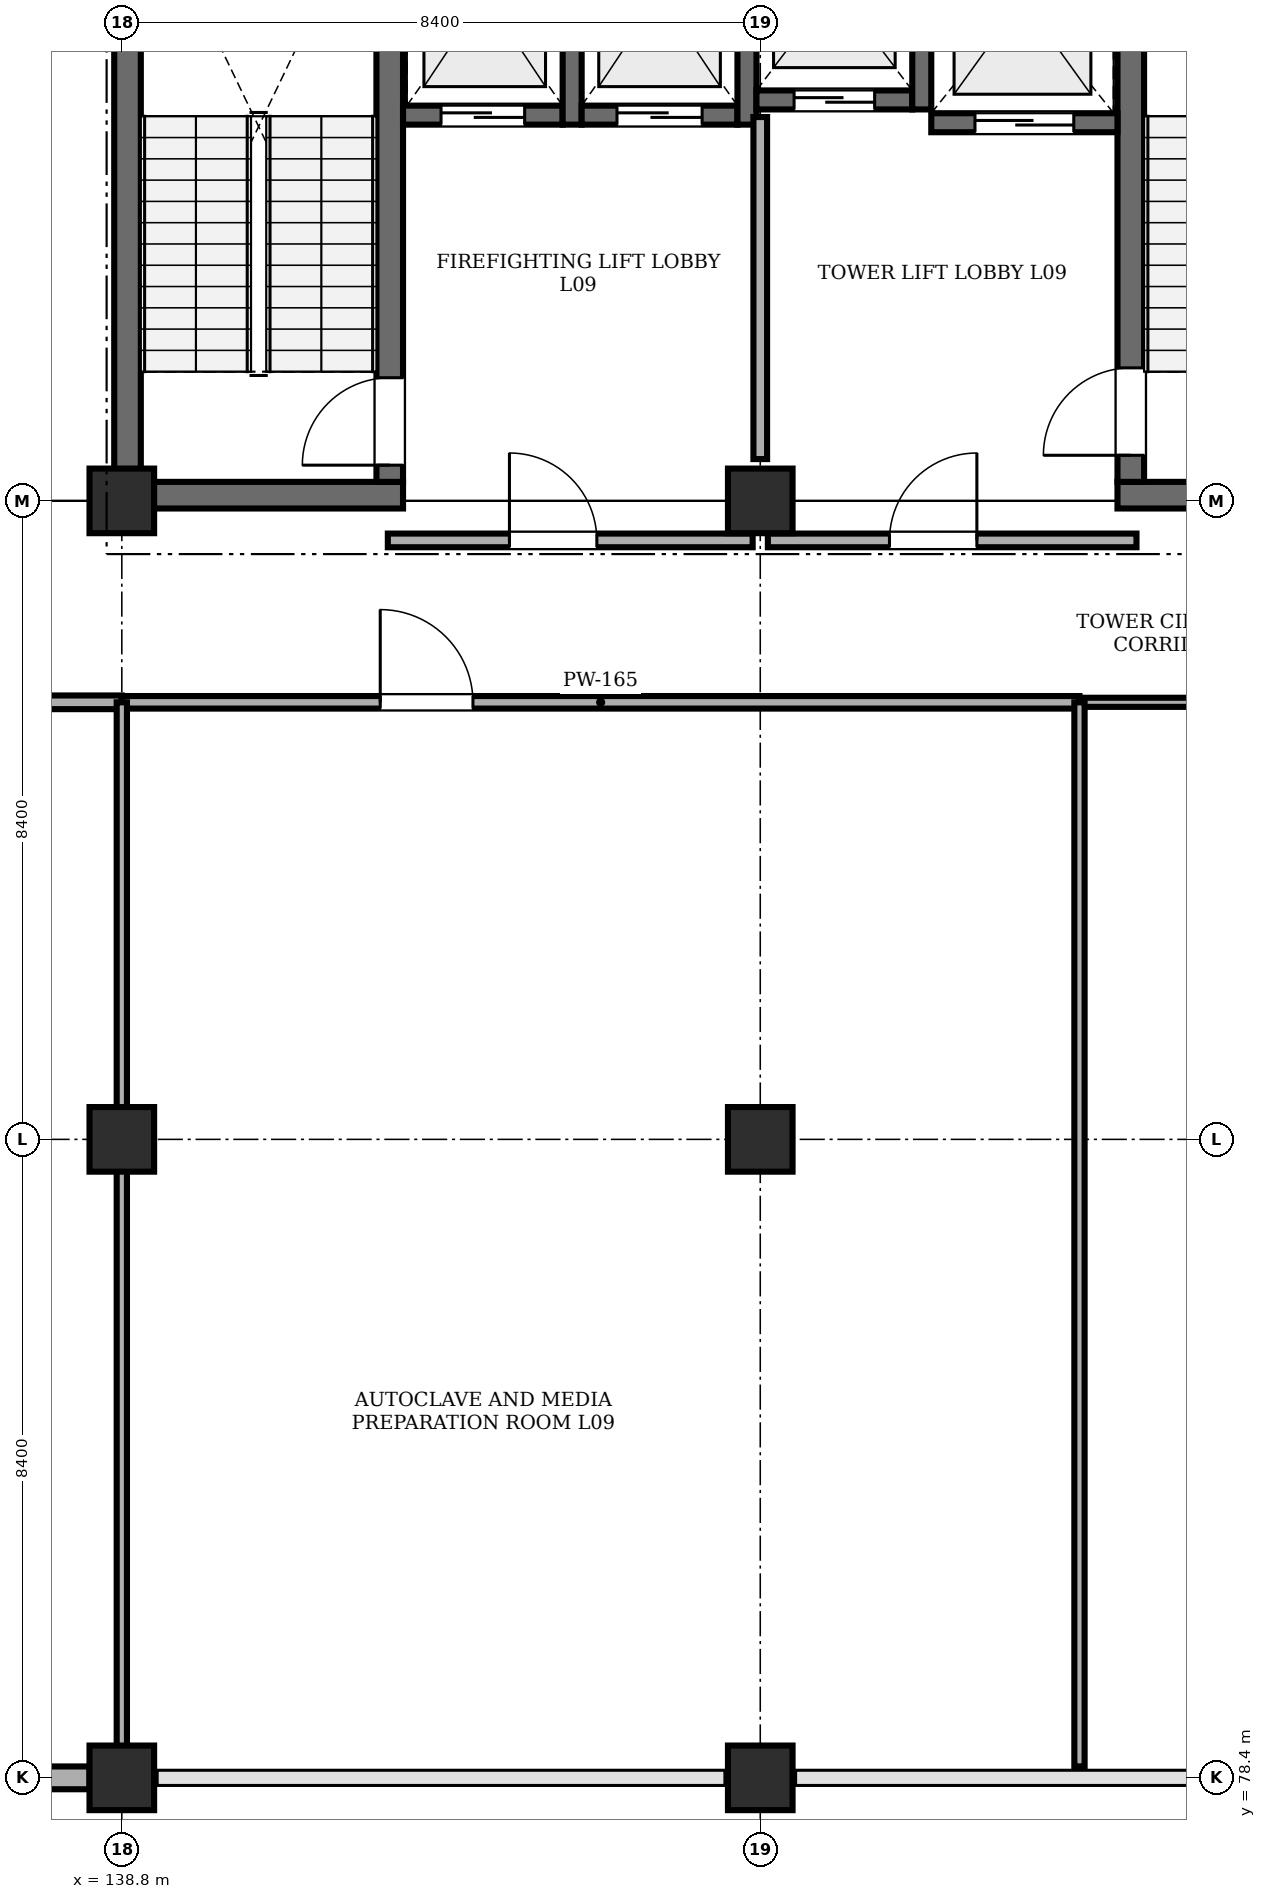
"""IFC4 building model, lengths in metres.
Left out: names, types, materials, properties, quantities, classifications, styles, units other than length and angle.
Written with IfcOpenShell. Run it as: python <this file> out.ifc"""

import sys

from ifc_helpers import new_model, si_unit, direction, frame, frame_2d, origin, origin_2d, place, context, subcontext, project, spatial, rectangle, extrude, element, fill, save


model = new_model("IFC4")
c1 = context("Model", 3, precision=1e-05, world=origin(), true_north=direction((0.0, 1.0)))
c2 = subcontext(c1, "Body", "Model", "MODEL_VIEW")
j1 = project(units=[si_unit("LENGTHUNIT", "METRE"), si_unit("PLANEANGLEUNIT", "RADIAN")], contexts=[c1])
p1 = place(None, origin())
s1 = spatial("IfcSite", under=j1, at=p1, CompositionType="ELEMENT")
p2 = place(p1, origin())
s2 = spatial("IfcBuilding", under=s1, at=p2, CompositionType="ELEMENT")
p3 = place(p2, frame((0.0, 0.0, 36.0)))
s3 = spatial("IfcBuildingStorey", under=s2, at=p3, CompositionType="ELEMENT", Elevation=36.0)
for number, where, z_axis, x_axis in (
    (1, (138.8, 78.4, 0.0), (0.0, 0.0, 1.0), (1.0, 0.0, 0.0)),
    (2, (138.8, 86.8, 0.0), (0.0, 0.0, 1.0), (1.0, 0.0, 0.0)),
    (3, (138.8, 95.2, 0.0), (0.0, 0.0, 1.0), (1.0, 0.0, 0.0)),
    (4, (147.2, 78.4, 0.0), (0.0, 0.0, 1.0), (1.0, 0.0, 0.0)),
    (5, (147.2, 86.8, 0.0), (0.0, 0.0, 1.0), (1.0, 0.0, 0.0)),
    (6, (147.2, 95.2, 0.0), (0.0, 0.0, 1.0), (1.0, 0.0, 0.0)),
):
    element("IfcColumn", number, at=place(p3, frame(where, z_axis=z_axis, x_axis=x_axis)), inside=s3, PredefinedType="COLUMN", context=c2, shape_type="SweptSolid", body=[
        extrude(rectangle(XDim=0.85, YDim=0.85, at=origin_2d()), origin(), (0.0, 0.0, 1.0), 4.02),
    ])
p4 = place(p3, frame((138.7, 95.275, 0.0), z_axis=(0.0, 0.0, 1.0), x_axis=(1.0, 0.0, 0.0)))
e7 = element("IfcWall", 7, at=p4, inside=s3, PredefinedType="SHEAR", context=c2, shape_type="SweptSolid", body=[
    extrude(rectangle(XDim=3.8, YDim=0.35, at=frame_2d((1.9, 0.0))), origin(), (0.0, 0.0, 1.0), 4.02),
])
p5 = place(p3, frame((138.875, 95.45, 0.0), z_axis=(0.0, 0.0, 1.0), x_axis=(0.0, 1.0, 0.0)))
e8 = element("IfcWall", 8, at=p5, inside=s3, PredefinedType="SHEAR", context=c2, shape_type="SweptSolid", body=[
    extrude(rectangle(XDim=7.9, YDim=0.35, at=frame_2d((3.95, 0.0))), origin(), (0.0, 0.0, 1.0), 4.02),
])
p6 = place(p3, frame((142.325, 95.45, 0.0), z_axis=(0.0, 0.0, 1.0), x_axis=(0.0, 1.0, 0.0)))
e9 = element("IfcWall", 9, at=p6, inside=s3, PredefinedType="SHEAR", context=c2, shape_type="SweptSolid", body=[
    extrude(rectangle(XDim=7.9, YDim=0.35, at=frame_2d((3.95, 0.0))), origin(), (0.0, 0.0, 1.0), 4.02),
])
p7 = place(p6, frame((0.22, 0.0, 0.0)))
e10 = element("IfcOpeningElement", 10, at=p7, cuts=e9, PredefinedType="OPENING", context=c2, shape_type="SweptSolid", body=[
    extrude(rectangle(XDim=1.15, YDim=2.15, at=frame_2d((0.575, 1.075))), frame((0.0, 0.185, 0.0), z_axis=(0.0, -1.0, 0.0), x_axis=(1.0, 0.0, 0.0)), (0.0, 0.0, 1.0), 0.37),
])
p8 = place(p3, frame((151.9, 95.275, 0.0), z_axis=(0.0, 0.0, 1.0), x_axis=(1.0, 0.0, 0.0)))
e11 = element("IfcWall", 11, at=p8, inside=s3, PredefinedType="SHEAR", context=c2, shape_type="SweptSolid", body=[
    extrude(rectangle(XDim=3.8, YDim=0.35, at=frame_2d((1.9, 0.0))), origin(), (0.0, 0.0, 1.0), 4.02),
])
p9 = place(p3, frame((152.075, 95.45, 0.0), z_axis=(0.0, 0.0, 1.0), x_axis=(0.0, 1.0, 0.0)))
e12 = element("IfcWall", 12, at=p9, inside=s3, PredefinedType="SHEAR", context=c2, shape_type="SweptSolid", body=[
    extrude(rectangle(XDim=7.9, YDim=0.35, at=frame_2d((3.95, 0.0))), origin(), (0.0, 0.0, 1.0), 4.02),
])
p10 = place(p9, frame((0.35, 0.0, 0.0)))
e13 = element("IfcOpeningElement", 13, at=p10, cuts=e12, PredefinedType="OPENING", context=c2, shape_type="SweptSolid", body=[
    extrude(rectangle(XDim=1.15, YDim=2.15, at=frame_2d((0.575, 1.075))), frame((0.0, 0.185, 0.0), z_axis=(0.0, -1.0, 0.0), x_axis=(1.0, 0.0, 0.0)), (0.0, 0.0, 1.0), 0.37),
])
p11 = place(p3, frame((142.5, 100.275, 0.0), z_axis=(0.0, 0.0, 1.0), x_axis=(1.0, 0.0, 0.0)))
e14 = element("IfcWall", 14, at=p11, inside=s3, PredefinedType="SHEAR", context=c2, shape_type="SweptSolid", body=[
    extrude(rectangle(XDim=2.1, YDim=0.25, at=frame_2d((1.05, 0.0))), origin(), (0.0, 0.0, 1.0), 4.02),
])
p12 = place(p11, frame((0.5, 0.0, 0.0)))
e15 = element("IfcOpeningElement", 15, at=p12, cuts=e14, PredefinedType="OPENING", context=c2, shape_type="SweptSolid", body=[
    extrude(rectangle(XDim=1.1, YDim=2.15, at=frame_2d((0.55, 1.075))), frame((0.0, 0.135, 0.0), z_axis=(0.0, -1.0, 0.0), x_axis=(1.0, 0.0, 0.0)), (0.0, 0.0, 1.0), 0.27),
])
p13 = place(p3, frame((144.725, 100.15, 0.0), z_axis=(0.0, 0.0, 1.0), x_axis=(0.0, 1.0, 0.0)))
e16 = element("IfcWall", 16, at=p13, inside=s3, PredefinedType="SHEAR", context=c2, shape_type="SweptSolid", body=[
    extrude(rectangle(XDim=3.4, YDim=0.25, at=frame_2d((1.7, 0.0))), origin(), (0.0, 0.0, 1.0), 4.02),
])
p14 = place(p3, frame((144.85, 100.275, 0.0), z_axis=(0.0, 0.0, 1.0), x_axis=(1.0, 0.0, 0.0)))
e17 = element("IfcWall", 17, at=p14, inside=s3, PredefinedType="SHEAR", context=c2, shape_type="SweptSolid", body=[
    extrude(rectangle(XDim=2.05, YDim=0.25, at=frame_2d((1.025, 0.0))), origin(), (0.0, 0.0, 1.0), 4.02),
])
p15 = place(p14, frame((0.465, 0.0, 0.0)))
e18 = element("IfcOpeningElement", 18, at=p15, cuts=e17, PredefinedType="OPENING", context=c2, shape_type="SweptSolid", body=[
    extrude(rectangle(XDim=1.12, YDim=2.15, at=frame_2d((0.56, 1.075))), frame((0.0, 0.135, 0.0), z_axis=(0.0, -1.0, 0.0), x_axis=(1.0, 0.0, 0.0)), (0.0, 0.0, 1.0), 0.27),
])
p16 = place(p3, frame((147.025, 100.15, 0.0), z_axis=(0.0, 0.0, 1.0), x_axis=(0.0, 1.0, 0.0)))
e19 = element("IfcWall", 19, at=p16, inside=s3, PredefinedType="SHEAR", context=c2, shape_type="SweptSolid", body=[
    extrude(rectangle(XDim=3.4, YDim=0.25, at=frame_2d((1.7, 0.0))), origin(), (0.0, 0.0, 1.0), 4.02),
])
p17 = place(p3, frame((147.15, 100.475, 0.0), z_axis=(0.0, 0.0, 1.0), x_axis=(1.0, 0.0, 0.0)))
e20 = element("IfcWall", 20, at=p17, inside=s3, PredefinedType="SHEAR", context=c2, shape_type="SweptSolid", body=[
    extrude(rectangle(XDim=2.05, YDim=0.25, at=frame_2d((1.025, 0.0))), origin(), (0.0, 0.0, 1.0), 4.02),
])
p18 = place(p17, frame((0.495, 0.0, 0.0)))
e21 = element("IfcOpeningElement", 21, at=p18, cuts=e20, PredefinedType="OPENING", context=c2, shape_type="SweptSolid", body=[
    extrude(rectangle(XDim=1.06, YDim=2.15, at=frame_2d((0.53, 1.075))), frame((0.0, 0.135, 0.0), z_axis=(0.0, -1.0, 0.0), x_axis=(1.0, 0.0, 0.0)), (0.0, 0.0, 1.0), 0.27),
])
p19 = place(p3, frame((149.325, 100.35, 0.0), z_axis=(0.0, 0.0, 1.0), x_axis=(0.0, 1.0, 0.0)))
e22 = element("IfcWall", 22, at=p19, inside=s3, PredefinedType="SHEAR", context=c2, shape_type="SweptSolid", body=[
    extrude(rectangle(XDim=3.2, YDim=0.25, at=frame_2d((1.6, 0.0))), origin(), (0.0, 0.0, 1.0), 4.02),
])
p20 = place(p3, frame((149.45, 100.175, 0.0), z_axis=(0.0, 0.0, 1.0), x_axis=(1.0, 0.0, 0.0)))
e23 = element("IfcWall", 23, at=p20, inside=s3, PredefinedType="SHEAR", context=c2, shape_type="SweptSolid", body=[
    extrude(rectangle(XDim=2.45, YDim=0.25, at=frame_2d((1.225, 0.0))), origin(), (0.0, 0.0, 1.0), 4.02),
])
p21 = place(p20, frame((0.575, 0.0, 0.0)))
e24 = element("IfcOpeningElement", 24, at=p21, cuts=e23, PredefinedType="OPENING", context=c2, shape_type="SweptSolid", body=[
    extrude(rectangle(XDim=1.3, YDim=2.25, at=frame_2d((0.65, 1.125))), frame((0.0, 0.135, 0.0), z_axis=(0.0, -1.0, 0.0), x_axis=(1.0, 0.0, 0.0)), (0.0, 0.0, 1.0), 0.27),
])
p22 = place(p3, frame((138.375, 78.4, 0.0), z_axis=(0.0, 0.0, 1.0), x_axis=(-1.0, 0.0, 0.0)))
e25 = element("IfcWall", 25, at=p22, inside=s3, PredefinedType="STANDARD", context=c2, shape_type="SweptSolid", body=[
    extrude(rectangle(XDim=7.55, YDim=0.3, at=frame_2d((3.775, 0.0))), origin(), (0.0, 0.0, 1.0), 3.32),
])
p23 = place(p22, frame((1.15, 0.0, 0.95)))
e26 = element("IfcOpeningElement", 26, at=p23, cuts=e25, PredefinedType="OPENING", context=c2, shape_type="SweptSolid", body=[
    extrude(rectangle(XDim=2.15, YDim=1.95, at=frame_2d((1.075, 0.975))), frame((0.0, 0.16, 0.0), z_axis=(0.0, -1.0, 0.0), x_axis=(1.0, 0.0, 0.0)), (0.0, 0.0, 1.0), 0.32),
])
p24 = place(p3, frame((142.3, 94.68, 0.0), z_axis=(0.0, 0.0, 1.0), x_axis=(1.0, 0.0, 0.0)))
e27 = element("IfcWall", 27, at=p24, inside=s3, PredefinedType="STANDARD", context=c2, shape_type="SweptSolid", body=[
    extrude(rectangle(XDim=4.8, YDim=0.18, at=frame_2d((2.4, 0.0))), origin(), (0.0, 0.0, 1.0), 4.02),
])
p25 = place(p24, frame((1.6, 0.0, 0.0)))
e28 = element("IfcOpeningElement", 28, at=p25, cuts=e27, PredefinedType="OPENING", context=c2, shape_type="SweptSolid", body=[
    extrude(rectangle(XDim=1.15, YDim=2.15, at=frame_2d((0.575, 1.075))), frame((0.0, 0.1, 0.0), z_axis=(0.0, -1.0, 0.0), x_axis=(1.0, 0.0, 0.0)), (0.0, 0.0, 1.0), 0.2),
])
p26 = place(p3, frame((147.3, 94.68, 0.0), z_axis=(0.0, 0.0, 1.0), x_axis=(1.0, 0.0, 0.0)))
e29 = element("IfcWall", 29, at=p26, inside=s3, PredefinedType="STANDARD", context=c2, shape_type="SweptSolid", body=[
    extrude(rectangle(XDim=4.85, YDim=0.18, at=frame_2d((2.425, 0.0))), origin(), (0.0, 0.0, 1.0), 4.02),
])
p27 = place(p26, frame((1.6, 0.0, 0.0)))
e30 = element("IfcOpeningElement", 30, at=p27, cuts=e29, PredefinedType="OPENING", context=c2, shape_type="SweptSolid", body=[
    extrude(rectangle(XDim=1.15, YDim=2.15, at=frame_2d((0.575, 1.075))), frame((0.0, 0.1, 0.0), z_axis=(0.0, -1.0, 0.0), x_axis=(1.0, 0.0, 0.0)), (0.0, 0.0, 1.0), 0.2),
])
p28 = place(p3, frame((147.2, 95.75, 0.0), z_axis=(0.0, 0.0, 1.0), x_axis=(0.0, 1.0, 0.0)))
e31 = element("IfcWall", 31, at=p28, inside=s3, PredefinedType="STANDARD", context=c2, shape_type="SweptSolid", body=[
    extrude(rectangle(XDim=4.5, YDim=0.18, at=frame_2d((2.25, 0.0))), origin(), (0.0, 0.0, 1.0), 3.32),
])
p29 = place(p3, frame((130.55, 92.55, 0.0), z_axis=(0.0, 0.0, 1.0), x_axis=(1.0, 0.0, 0.0)))
e32 = element("IfcWall", 32, at=p29, inside=s3, PredefinedType="STANDARD", context=c2, shape_type="SweptSolid", body=[
    extrude(rectangle(XDim=8.25, YDim=0.18, at=frame_2d((4.125, 0.0))), origin(), (0.0, 0.0, 1.0), 4.02),
])
p30 = place(p29, frame((3.65, 0.0, 0.0)))
e33 = element("IfcOpeningElement", 33, at=p30, cuts=e32, PredefinedType="OPENING", context=c2, shape_type="SweptSolid", body=[
    extrude(rectangle(XDim=1.05, YDim=2.15, at=frame_2d((0.525, 1.075))), frame((0.0, 0.1, 0.0), z_axis=(0.0, -1.0, 0.0), x_axis=(1.0, 0.0, 0.0)), (0.0, 0.0, 1.0), 0.2),
])
p31 = place(p3, frame((138.8, 92.55, 0.0), z_axis=(0.0, 0.0, 1.0), x_axis=(1.0, 0.0, 0.0)))
e34 = element("IfcWall", 34, at=p31, inside=s3, PredefinedType="PARTITIONING", context=c2, shape_type="SweptSolid", body=[
    extrude(rectangle(XDim=12.6, YDim=0.165, at=frame_2d((6.3, 0.0))), origin(), (0.0, 0.0, 1.0), 4.02),
])
p32 = place(p31, frame((3.4, 0.0, 0.0)))
e35 = element("IfcOpeningElement", 35, at=p32, cuts=e34, PredefinedType="OPENING", context=c2, shape_type="SweptSolid", body=[
    extrude(rectangle(XDim=1.22, YDim=2.2, at=frame_2d((0.61, 1.1))), frame((0.0, 0.093, 0.0), z_axis=(0.0, -1.0, 0.0), x_axis=(1.0, 0.0, 0.0)), (0.0, 0.0, 1.0), 0.185),
])
p33 = place(p3, frame((138.8, 78.55, 0.0), z_axis=(0.0, 0.0, 1.0), x_axis=(0.0, 1.0, 0.0)))
e36 = element("IfcWall", 36, at=p33, inside=s3, PredefinedType="PARTITIONING", context=c2, shape_type="SweptSolid", body=[
    extrude(rectangle(XDim=14.0, YDim=0.135, at=frame_2d((7.0, 0.0))), origin(), (0.0, 0.0, 1.0), 3.32),
])
p34 = place(p3, frame((151.4, 92.55, 0.0), z_axis=(0.0, 0.0, 1.0), x_axis=(1.0, 0.0, 0.0)))
e37 = element("IfcWall", 37, at=p34, inside=s3, PredefinedType="PARTITIONING", context=c2, shape_type="SweptSolid", body=[
    extrude(rectangle(XDim=11.95, YDim=0.12, at=frame_2d((5.975, 0.0))), origin(), (0.0, 0.0, 1.0), 4.02),
])
p35 = place(p34, frame((6.8, 0.0, 0.0)))
e38 = element("IfcOpeningElement", 38, at=p35, cuts=e37, PredefinedType="OPENING", context=c2, shape_type="SweptSolid", body=[
    extrude(rectangle(XDim=1.08, YDim=2.15, at=frame_2d((0.54, 1.075))), frame((0.0, 0.07, 0.0), z_axis=(0.0, -1.0, 0.0), x_axis=(1.0, 0.0, 0.0)), (0.0, 0.0, 1.0), 0.14),
])
p36 = place(p3, frame((151.4, 78.55, 0.0), z_axis=(0.0, 0.0, 1.0), x_axis=(0.0, 1.0, 0.0)))
e39 = element("IfcWall", 39, at=p36, inside=s3, PredefinedType="PARTITIONING", context=c2, shape_type="SweptSolid", body=[
    extrude(rectangle(XDim=14.0, YDim=0.135, at=frame_2d((7.0, 0.0))), origin(), (0.0, 0.0, 1.0), 3.52),
])
p37 = place(p25, origin())
e40 = element("IfcDoor", 40, at=p37, inside=s3, OperationType="SINGLE_SWING_LEFT", PredefinedType="DOOR", context=c2, shape_type="SweptSolid", body=[
    extrude(rectangle(XDim=1.15, YDim=2.15, at=frame_2d((0.575, 1.075))), frame((0.0, 0.025, 0.0), z_axis=(0.0, -1.0, 0.0), x_axis=(1.0, 0.0, 0.0)), (0.0, 0.0, 1.0), 0.05),
])
fill(e28, e40)
p38 = place(p27, origin())
e41 = element("IfcDoor", 41, at=p38, inside=s3, OperationType="SINGLE_SWING_RIGHT", PredefinedType="DOOR", context=c2, shape_type="SweptSolid", body=[
    extrude(rectangle(XDim=1.15, YDim=2.15, at=frame_2d((0.575, 1.075))), frame((0.0, 0.025, 0.0), z_axis=(0.0, -1.0, 0.0), x_axis=(1.0, 0.0, 0.0)), (0.0, 0.0, 1.0), 0.05),
])
fill(e30, e41)
p39 = place(p32, origin())
e42 = element("IfcDoor", 42, at=p39, inside=s3, OperationType="SINGLE_SWING_LEFT", PredefinedType="DOOR", context=c2, shape_type="SweptSolid", body=[
    extrude(rectangle(XDim=1.22, YDim=2.2, at=frame_2d((0.61, 1.1))), frame((0.0, 0.025, 0.0), z_axis=(0.0, -1.0, 0.0), x_axis=(1.0, 0.0, 0.0)), (0.0, 0.0, 1.0), 0.05),
])
fill(e35, e42)
p40 = place(p7, origin())
e43 = element("IfcDoor", 43, at=p40, inside=s3, OperationType="SINGLE_SWING_LEFT", PredefinedType="DOOR", context=c2, shape_type="SweptSolid", body=[
    extrude(rectangle(XDim=1.15, YDim=2.15, at=frame_2d((0.575, 1.075))), frame((0.0, 0.025, 0.0), z_axis=(0.0, -1.0, 0.0), x_axis=(1.0, 0.0, 0.0)), (0.0, 0.0, 1.0), 0.05),
])
fill(e10, e43)
p41 = place(p10, origin())
e44 = element("IfcDoor", 44, at=p41, inside=s3, OperationType="SINGLE_SWING_LEFT", PredefinedType="DOOR", context=c2, shape_type="SweptSolid", body=[
    extrude(rectangle(XDim=1.15, YDim=2.15, at=frame_2d((0.575, 1.075))), frame((0.0, 0.025, 0.0), z_axis=(0.0, -1.0, 0.0), x_axis=(1.0, 0.0, 0.0)), (0.0, 0.0, 1.0), 0.05),
])
fill(e13, e44)
p42 = place(p12, origin())
e45 = element("IfcDoor", 45, at=p42, inside=s3, OperationType="SLIDING_TO_LEFT", PredefinedType="DOOR", context=c2, shape_type="SweptSolid", body=[
    extrude(rectangle(XDim=1.1, YDim=2.15, at=frame_2d((0.55, 1.075))), frame((0.0, 0.025, 0.0), z_axis=(0.0, -1.0, 0.0), x_axis=(1.0, 0.0, 0.0)), (0.0, 0.0, 1.0), 0.05),
])
fill(e15, e45)
p43 = place(p15, origin())
e46 = element("IfcDoor", 46, at=p43, inside=s3, OperationType="SLIDING_TO_LEFT", PredefinedType="DOOR", context=c2, shape_type="SweptSolid", body=[
    extrude(rectangle(XDim=1.12, YDim=2.15, at=frame_2d((0.56, 1.075))), frame((0.0, 0.025, 0.0), z_axis=(0.0, -1.0, 0.0), x_axis=(1.0, 0.0, 0.0)), (0.0, 0.0, 1.0), 0.05),
])
fill(e18, e46)
p44 = place(p18, origin())
e47 = element("IfcDoor", 47, at=p44, inside=s3, OperationType="SLIDING_TO_LEFT", PredefinedType="DOOR", context=c2, shape_type="SweptSolid", body=[
    extrude(rectangle(XDim=1.06, YDim=2.15, at=frame_2d((0.53, 1.075))), frame((0.0, 0.025, 0.0), z_axis=(0.0, -1.0, 0.0), x_axis=(1.0, 0.0, 0.0)), (0.0, 0.0, 1.0), 0.05),
])
fill(e21, e47)
p45 = place(p21, origin())
e48 = element("IfcDoor", 48, at=p45, inside=s3, OperationType="SLIDING_TO_LEFT", PredefinedType="DOOR", context=c2, shape_type="SweptSolid", body=[
    extrude(rectangle(XDim=1.3, YDim=2.25, at=frame_2d((0.65, 1.125))), frame((0.0, 0.025, 0.0), z_axis=(0.0, -1.0, 0.0), x_axis=(1.0, 0.0, 0.0)), (0.0, 0.0, 1.0), 0.05),
])
fill(e24, e48)
save(model, sys.argv[1])
